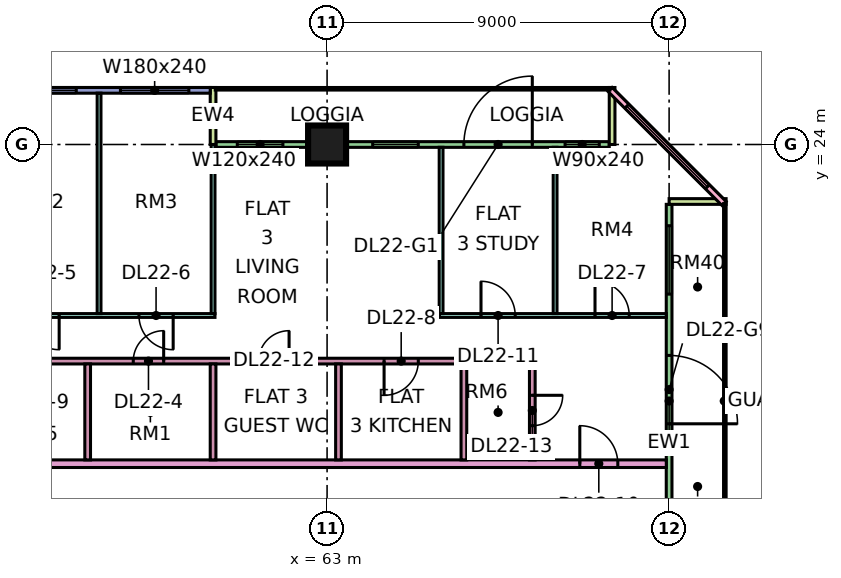
"""IFC4 building model, lengths in metres.
Left out: names, types, materials, properties, quantities, classifications, styles, units other than length and angle.
Written with IfcOpenShell. Run it as: python <this file> out.ifc"""

import sys

from ifc_helpers import new_model, si_unit, direction, frame, frame_2d, origin, origin_2d, place, context, subcontext, project, spatial, rectangle, extrude, element, fill, save


model = new_model("IFC4")
c1 = context("Model", 3, precision=1e-05, world=origin(), true_north=direction((0.0, 1.0)))
c2 = subcontext(c1, "Body", "Model", "MODEL_VIEW")
j1 = project(units=[si_unit("LENGTHUNIT", "METRE"), si_unit("PLANEANGLEUNIT", "RADIAN")], contexts=[c1])
p1 = place(None, origin())
s1 = spatial("IfcSite", under=j1, at=p1, CompositionType="ELEMENT")
p2 = place(p1, origin())
s2 = spatial("IfcBuilding", under=s1, at=p2, CompositionType="ELEMENT")
p3 = place(p2, frame((0.0, 0.0, 99.4)))
s3 = spatial("IfcBuildingStorey", under=s2, at=p3, CompositionType="ELEMENT", Elevation=99.4)
p4 = place(p3, frame((63.0, 24.0, 0.0), z_axis=(0.0, 0.0, 1.0), x_axis=(1.0, 0.0, 0.0)))
e1 = element("IfcColumn", 1, at=p4, inside=s3, PredefinedType="COLUMN", context=c2, shape_type="SweptSolid", body=[
    extrude(rectangle(XDim=1.0, YDim=1.0, at=origin_2d()), origin(), (0.0, 0.0, 1.0), 3.75),
])
p5 = place(p3, frame((70.425, 24.0, 0.0), z_axis=(0.0, 0.0, 1.0), x_axis=(-1.0, 0.0, 0.0)))
e2 = element("IfcWall", 2, at=p5, inside=s3, PredefinedType="SOLIDWALL", context=c2, shape_type="SweptSolid", body=[
    extrude(rectangle(XDim=10.35, YDim=0.15, at=frame_2d((5.175, 0.0))), origin(), (0.0, 0.0, 1.0), 3.35),
])
p6 = place(p5, frame((0.262, 0.0, 0.45)))
e3 = element("IfcOpeningElement", 3, at=p6, cuts=e2, PredefinedType="OPENING", context=c2, shape_type="SweptSolid", body=[
    extrude(rectangle(XDim=0.9, YDim=2.4, at=frame_2d((0.45, 1.2))), frame((0.0, 0.085, 0.0), z_axis=(0.0, -1.0, 0.0), x_axis=(1.0, 0.0, 0.0)), (0.0, 0.0, 1.0), 0.17),
])
p7 = place(p5, frame((2.025, 0.0, 0.0)))
e4 = element("IfcOpeningElement", 4, at=p7, cuts=e2, PredefinedType="OPENING", context=c2, shape_type="SweptSolid", body=[
    extrude(rectangle(XDim=1.8, YDim=2.4, at=frame_2d((0.9, 1.2))), frame((0.0, 0.085, 0.0), z_axis=(0.0, -1.0, 0.0), x_axis=(1.0, 0.0, 0.0)), (0.0, 0.0, 1.0), 0.17),
])
p8 = place(p5, frame((5.025, 0.0, 0.45)))
e5 = element("IfcOpeningElement", 5, at=p8, cuts=e2, PredefinedType="OPENING", context=c2, shape_type="SweptSolid", body=[
    extrude(rectangle(XDim=1.2, YDim=2.4, at=frame_2d((0.6, 1.2))), frame((0.0, 0.085, 0.0), z_axis=(0.0, -1.0, 0.0), x_axis=(1.0, 0.0, 0.0)), (0.0, 0.0, 1.0), 0.17),
])
p9 = place(p5, frame((8.587, 0.0, 0.45)))
e6 = element("IfcOpeningElement", 6, at=p9, cuts=e2, PredefinedType="OPENING", context=c2, shape_type="SweptSolid", body=[
    extrude(rectangle(XDim=1.2, YDim=2.4, at=frame_2d((0.6, 1.2))), frame((0.0, 0.085, 0.0), z_axis=(0.0, -1.0, 0.0), x_axis=(1.0, 0.0, 0.0)), (0.0, 0.0, 1.0), 0.17),
])
for number, where, z_axis, x_axis in (
    (7, (70.5, 25.5, 0.0), (0.0, 0.0, 1.0), (0.0, -1.0, 0.0)),
    (8, (60.0, 25.5, 0.0), (0.0, 0.0, 1.0), (0.0, -1.0, 0.0)),
):
    element("IfcWall", number, at=place(p3, frame(where, z_axis=z_axis, x_axis=x_axis)), inside=s3, PredefinedType="SOLIDWALL", context=c2, shape_type="SweptSolid", body=[
        extrude(rectangle(XDim=1.5, YDim=0.15, at=frame_2d((0.75, 0.0))), origin(), (0.0, 0.0, 1.0), 3.35),
    ])
p10 = place(p3, frame((59.925, 25.425, 0.0), z_axis=(0.0, 0.0, 1.0), x_axis=(-1.0, 0.0, 0.0)))
e9 = element("IfcWall", 9, at=p10, inside=s3, PredefinedType="SOLIDWALL", context=c2, shape_type="SweptSolid", body=[
    extrude(rectangle(XDim=11.85, YDim=0.15, at=frame_2d((5.925, 0.0))), origin(), (0.0, 0.0, 1.0), 3.35),
])
p11 = place(p10, frame((0.562, 0.0, 0.45)))
e10 = element("IfcOpeningElement", 10, at=p11, cuts=e9, PredefinedType="OPENING", context=c2, shape_type="SweptSolid", body=[
    extrude(rectangle(XDim=1.8, YDim=2.4, at=frame_2d((0.9, 1.2))), frame((0.0, 0.085, 0.0), z_axis=(0.0, -1.0, 0.0), x_axis=(1.0, 0.0, 0.0)), (0.0, 0.0, 1.0), 0.17),
])
p12 = place(p10, frame((3.525, 0.0, 0.45)))
e11 = element("IfcOpeningElement", 11, at=p12, cuts=e9, PredefinedType="OPENING", context=c2, shape_type="SweptSolid", body=[
    extrude(rectangle(XDim=1.8, YDim=2.4, at=frame_2d((0.9, 1.2))), frame((0.0, 0.085, 0.0), z_axis=(0.0, -1.0, 0.0), x_axis=(1.0, 0.0, 0.0)), (0.0, 0.0, 1.0), 0.17),
])
p13 = place(p10, frame((6.488, 0.0, 0.45)))
e12 = element("IfcOpeningElement", 12, at=p13, cuts=e9, PredefinedType="OPENING", context=c2, shape_type="SweptSolid", body=[
    extrude(rectangle(XDim=4.8, YDim=2.4, at=frame_2d((2.4, 1.2))), frame((0.0, 0.085, 0.0), z_axis=(0.0, -1.0, 0.0), x_axis=(1.0, 0.0, 0.0)), (0.0, 0.0, 1.0), 0.17),
])
p14 = place(p3, frame((72.0, 12.075, 0.0), z_axis=(0.0, 0.0, 1.0), x_axis=(0.0, 1.0, 0.0)))
e13 = element("IfcWall", 13, at=p14, inside=s3, PredefinedType="SOLIDWALL", context=c2, shape_type="SweptSolid", body=[
    extrude(rectangle(XDim=10.35, YDim=0.15, at=frame_2d((5.175, 0.0))), origin(), (0.0, 0.0, 1.0), 3.35),
])
p15 = place(p14, frame((4.575, 0.0, 0.0)))
e14 = element("IfcOpeningElement", 14, at=p15, cuts=e13, PredefinedType="OPENING", context=c2, shape_type="SweptSolid", body=[
    extrude(rectangle(XDim=1.8, YDim=2.4, at=frame_2d((0.9, 1.2))), frame((0.0, 0.085, 0.0), z_axis=(0.0, -1.0, 0.0), x_axis=(1.0, 0.0, 0.0)), (0.0, 0.0, 1.0), 0.17),
])
p16 = place(p14, frame((7.988, 0.0, 0.45)))
e15 = element("IfcOpeningElement", 15, at=p16, cuts=e13, PredefinedType="OPENING", context=c2, shape_type="SweptSolid", body=[
    extrude(rectangle(XDim=1.8, YDim=2.4, at=frame_2d((0.9, 1.2))), frame((0.0, 0.085, 0.0), z_axis=(0.0, -1.0, 0.0), x_axis=(1.0, 0.0, 0.0)), (0.0, 0.0, 1.0), 0.17),
])
p17 = place(p3, frame((73.5, 22.5, 0.0), z_axis=(0.0, 0.0, 1.0), x_axis=(-1.0, 0.0, 0.0)))
e16 = element("IfcWall", 16, at=p17, inside=s3, PredefinedType="SOLIDWALL", context=c2, shape_type="SweptSolid", body=[
    extrude(rectangle(XDim=1.5, YDim=0.15, at=frame_2d((0.75, 0.0))), origin(), (0.0, 0.0, 1.0), 3.35),
])
p18 = place(p3, frame((73.447, 22.447, 0.0), z_axis=(0.0, 0.0, 1.0), x_axis=(-0.707106781187, 0.707106781187, 0.0)))
e17 = element("IfcWall", 17, at=p18, inside=s3, PredefinedType="SOLIDWALL", context=c2, shape_type="SweptSolid", body=[
    extrude(rectangle(XDim=4.243, YDim=0.15, at=frame_2d((2.121, 0.0))), origin(), (0.0, 0.0, 1.0), 3.35),
])
p19 = place(p18, frame((0.621, 0.0, 0.45)))
e18 = element("IfcOpeningElement", 18, at=p19, cuts=e17, PredefinedType="OPENING", context=c2, shape_type="SweptSolid", body=[
    extrude(rectangle(XDim=3.0, YDim=2.4, at=frame_2d((1.5, 1.2))), frame((0.0, 0.085, 0.0), z_axis=(0.0, -1.0, 0.0), x_axis=(1.0, 0.0, 0.0)), (0.0, 0.0, 1.0), 0.17),
])
p20 = place(p3, frame((51.225, 15.6, 0.0), z_axis=(0.0, 0.0, 1.0), x_axis=(1.0, 0.0, 0.0)))
e19 = element("IfcWall", 19, at=p20, inside=s3, PredefinedType="PARTITIONING", context=c2, shape_type="SweptSolid", body=[
    extrude(rectangle(XDim=20.701, YDim=0.2, at=frame_2d((10.351, 0.0))), origin(), (0.0, 0.0, 1.0), 3.35),
])
p21 = place(p20, frame((18.425, 0.0, 0.0)))
e20 = element("IfcOpeningElement", 20, at=p21, cuts=e19, PredefinedType="OPENING", context=c2, shape_type="SweptSolid", body=[
    extrude(rectangle(XDim=1.0, YDim=2.1, at=frame_2d((0.5, 1.05))), frame((0.0, 0.11, 0.0), z_axis=(0.0, -1.0, 0.0), x_axis=(1.0, 0.0, 0.0)), (0.0, 0.0, 1.0), 0.22),
])
p22 = place(p20, frame((0.875, 0.0, 0.0)))
e21 = element("IfcOpeningElement", 21, at=p22, cuts=e19, PredefinedType="OPENING", context=c2, shape_type="SweptSolid", body=[
    extrude(rectangle(XDim=1.0, YDim=2.1, at=frame_2d((0.5, 1.05))), frame((0.0, 0.11, 0.0), z_axis=(0.0, -1.0, 0.0), x_axis=(1.0, 0.0, 0.0)), (0.0, 0.0, 1.0), 0.22),
])
p23 = place(p3, frame((54.1, 18.3, 0.0), z_axis=(0.0, 0.0, 1.0), x_axis=(1.0, 0.0, 0.0)))
e22 = element("IfcWall", 22, at=p23, inside=s3, PredefinedType="PARTITIONING", context=c2, shape_type="SweptSolid", body=[
    extrude(rectangle(XDim=14.375, YDim=0.15, at=frame_2d((7.188, 0.0))), origin(), (0.0, 0.0, 1.0), 3.35),
])
p24 = place(p23, frame((3.8, 0.0, 0.0)))
e23 = element("IfcOpeningElement", 23, at=p24, cuts=e22, PredefinedType="OPENING", context=c2, shape_type="SweptSolid", body=[
    extrude(rectangle(XDim=0.8, YDim=2.1, at=frame_2d((0.4, 1.05))), frame((0.0, 0.085, 0.0), z_axis=(0.0, -1.0, 0.0), x_axis=(1.0, 0.0, 0.0)), (0.0, 0.0, 1.0), 0.17),
])
p25 = place(p23, frame((10.4, 0.0, 0.0)))
e24 = element("IfcOpeningElement", 24, at=p25, cuts=e22, PredefinedType="OPENING", context=c2, shape_type="SweptSolid", body=[
    extrude(rectangle(XDim=0.9, YDim=2.1, at=frame_2d((0.45, 1.05))), frame((0.0, 0.085, 0.0), z_axis=(0.0, -1.0, 0.0), x_axis=(1.0, 0.0, 0.0)), (0.0, 0.0, 1.0), 0.17),
])
p26 = place(p23, frame((0.8, 0.0, 0.0)))
e25 = element("IfcOpeningElement", 25, at=p26, cuts=e22, PredefinedType="OPENING", context=c2, shape_type="SweptSolid", body=[
    extrude(rectangle(XDim=0.8, YDim=2.1, at=frame_2d((0.4, 1.05))), frame((0.0, 0.085, 0.0), z_axis=(0.0, -1.0, 0.0), x_axis=(1.0, 0.0, 0.0)), (0.0, 0.0, 1.0), 0.17),
])
p27 = place(p23, frame((7.1, 0.0, 0.0)))
e26 = element("IfcOpeningElement", 26, at=p27, cuts=e22, PredefinedType="OPENING", context=c2, shape_type="SweptSolid", body=[
    extrude(rectangle(XDim=0.8, YDim=2.1, at=frame_2d((0.4, 1.05))), frame((0.0, 0.085, 0.0), z_axis=(0.0, -1.0, 0.0), x_axis=(1.0, 0.0, 0.0)), (0.0, 0.0, 1.0), 0.17),
])
p28 = place(p3, frame((54.1, 19.5, 0.0), z_axis=(0.0, 0.0, 1.0), x_axis=(1.0, 0.0, 0.0)))
e27 = element("IfcWall", 27, at=p28, inside=s3, PredefinedType="PARTITIONING", context=c2, shape_type="SweptSolid", body=[
    extrude(rectangle(XDim=5.95, YDim=0.1, at=frame_2d((2.975, 0.0))), origin(), (0.0, 0.0, 1.0), 3.35),
])
p29 = place(p28, frame((0.95, 0.0, 0.0)))
e28 = element("IfcOpeningElement", 28, at=p29, cuts=e27, PredefinedType="OPENING", context=c2, shape_type="SweptSolid", body=[
    extrude(rectangle(XDim=0.9, YDim=2.1, at=frame_2d((0.45, 1.05))), frame((0.0, 0.06, 0.0), z_axis=(0.0, -1.0, 0.0), x_axis=(1.0, 0.0, 0.0)), (0.0, 0.0, 1.0), 0.12),
])
p30 = place(p28, frame((3.95, 0.0, 0.0)))
e29 = element("IfcOpeningElement", 29, at=p30, cuts=e27, PredefinedType="OPENING", context=c2, shape_type="SweptSolid", body=[
    extrude(rectangle(XDim=0.9, YDim=2.1, at=frame_2d((0.45, 1.05))), frame((0.0, 0.06, 0.0), z_axis=(0.0, -1.0, 0.0), x_axis=(1.0, 0.0, 0.0)), (0.0, 0.0, 1.0), 0.12),
])
p31 = place(p3, frame((56.7, 15.7, 0.0), z_axis=(0.0, 0.0, 1.0), x_axis=(0.0, 1.0, 0.0)))
e30 = element("IfcWall", 30, at=p31, inside=s3, PredefinedType="PARTITIONING", context=c2, shape_type="SweptSolid", body=[
    extrude(rectangle(XDim=2.525, YDim=0.15, at=frame_2d((1.263, 0.0))), origin(), (0.0, 0.0, 1.0), 3.35),
])
p32 = place(p3, frame((57.0, 19.55, 0.0), z_axis=(0.0, 0.0, 1.0), x_axis=(0.0, 1.0, 0.0)))
e31 = element("IfcWall", 31, at=p32, inside=s3, PredefinedType="PARTITIONING", context=c2, shape_type="SweptSolid", body=[
    extrude(rectangle(XDim=5.801, YDim=0.1, at=frame_2d((2.9, 0.0))), origin(), (0.0, 0.0, 1.0), 3.35),
])
p33 = place(p3, frame((60.0, 15.7, 0.0), z_axis=(0.0, 0.0, 1.0), x_axis=(0.0, 1.0, 0.0)))
e32 = element("IfcWall", 32, at=p33, inside=s3, PredefinedType="PARTITIONING", context=c2, shape_type="SweptSolid", body=[
    extrude(rectangle(XDim=2.525, YDim=0.15, at=frame_2d((1.263, 0.0))), origin(), (0.0, 0.0, 1.0), 3.35),
])
p34 = place(p3, frame((60.0, 19.55, 0.0), z_axis=(0.0, 0.0, 1.0), x_axis=(0.0, 1.0, 0.0)))
e33 = element("IfcWall", 33, at=p34, inside=s3, PredefinedType="PARTITIONING", context=c2, shape_type="SweptSolid", body=[
    extrude(rectangle(XDim=4.45, YDim=0.1, at=frame_2d((2.225, 0.0))), origin(), (0.0, 0.0, 1.0), 3.35),
])
p35 = place(p3, frame((63.3, 15.7, 0.0), z_axis=(0.0, 0.0, 1.0), x_axis=(0.0, 1.0, 0.0)))
e34 = element("IfcWall", 34, at=p35, inside=s3, PredefinedType="PARTITIONING", context=c2, shape_type="SweptSolid", body=[
    extrude(rectangle(XDim=2.525, YDim=0.15, at=frame_2d((1.263, 0.0))), origin(), (0.0, 0.0, 1.0), 3.35),
])
p36 = place(p3, frame((65.95, 19.5, 0.0), z_axis=(0.0, 0.0, 1.0), x_axis=(1.0, 0.0, 0.0)))
e35 = element("IfcWall", 35, at=p36, inside=s3, PredefinedType="PARTITIONING", context=c2, shape_type="SweptSolid", body=[
    extrude(rectangle(XDim=5.976, YDim=0.1, at=frame_2d((2.988, 0.0))), origin(), (0.0, 0.0, 1.0), 3.35),
])
p37 = place(p36, frame((4.1, 0.0, 0.0)))
e36 = element("IfcOpeningElement", 36, at=p37, cuts=e35, PredefinedType="OPENING", context=c2, shape_type="SweptSolid", body=[
    extrude(rectangle(XDim=0.9, YDim=2.1, at=frame_2d((0.45, 1.05))), frame((0.0, 0.06, 0.0), z_axis=(0.0, -1.0, 0.0), x_axis=(1.0, 0.0, 0.0)), (0.0, 0.0, 1.0), 0.12),
])
p38 = place(p36, frame((1.1, 0.0, 0.0)))
e37 = element("IfcOpeningElement", 37, at=p38, cuts=e35, PredefinedType="OPENING", context=c2, shape_type="SweptSolid", body=[
    extrude(rectangle(XDim=0.9, YDim=2.1, at=frame_2d((0.45, 1.05))), frame((0.0, 0.06, 0.0), z_axis=(0.0, -1.0, 0.0), x_axis=(1.0, 0.0, 0.0)), (0.0, 0.0, 1.0), 0.12),
])
p39 = place(p3, frame((66.0, 19.55, 0.0), z_axis=(0.0, 0.0, 1.0), x_axis=(0.0, 1.0, 0.0)))
e38 = element("IfcWall", 38, at=p39, inside=s3, PredefinedType="PARTITIONING", context=c2, shape_type="SweptSolid", body=[
    extrude(rectangle(XDim=4.376, YDim=0.1, at=frame_2d((2.188, 0.0))), origin(), (0.0, 0.0, 1.0), 3.35),
])
p40 = place(p3, frame((66.6, 15.7, 0.0), z_axis=(0.0, 0.0, 1.0), x_axis=(0.0, 1.0, 0.0)))
e39 = element("IfcWall", 39, at=p40, inside=s3, PredefinedType="PARTITIONING", context=c2, shape_type="SweptSolid", body=[
    extrude(rectangle(XDim=2.525, YDim=0.15, at=frame_2d((1.263, 0.0))), origin(), (0.0, 0.0, 1.0), 3.35),
])
p41 = place(p3, frame((68.4, 15.7, 0.0), z_axis=(0.0, 0.0, 1.0), x_axis=(0.0, 1.0, 0.0)))
e40 = element("IfcWall", 40, at=p41, inside=s3, PredefinedType="PARTITIONING", context=c2, shape_type="SweptSolid", body=[
    extrude(rectangle(XDim=2.525, YDim=0.15, at=frame_2d((1.263, 0.0))), origin(), (0.0, 0.0, 1.0), 3.35),
])
p42 = place(p41, frame((0.9, 0.0, 0.0)))
e41 = element("IfcOpeningElement", 41, at=p42, cuts=e40, PredefinedType="OPENING", context=c2, shape_type="SweptSolid", body=[
    extrude(rectangle(XDim=0.8, YDim=2.1, at=frame_2d((0.4, 1.05))), frame((0.0, 0.085, 0.0), z_axis=(0.0, -1.0, 0.0), x_axis=(1.0, 0.0, 0.0)), (0.0, 0.0, 1.0), 0.17),
])
p43 = place(p3, frame((69.0, 19.55, 0.0), z_axis=(0.0, 0.0, 1.0), x_axis=(0.0, 1.0, 0.0)))
e42 = element("IfcWall", 42, at=p43, inside=s3, PredefinedType="PARTITIONING", context=c2, shape_type="SweptSolid", body=[
    extrude(rectangle(XDim=4.376, YDim=0.1, at=frame_2d((2.188, 0.0))), origin(), (0.0, 0.0, 1.0), 3.35),
])
p44 = place(p6, origin())
e43 = element("IfcWindow", 43, at=p44, inside=s3, PartitioningType="SINGLE_PANEL", PredefinedType="WINDOW", context=c2, shape_type="SweptSolid", body=[
    extrude(rectangle(XDim=0.9, YDim=2.4, at=frame_2d((0.45, 1.2))), frame((0.0, 0.03, 0.0), z_axis=(0.0, -1.0, 0.0), x_axis=(1.0, 0.0, 0.0)), (0.0, 0.0, 1.0), 0.06),
])
fill(e3, e43)
p45 = place(p7, frame((1.8, 0.0, 0.0), z_axis=(0.0, 0.0, 1.0), x_axis=(-1.0, 0.0, 0.0)))
e44 = element("IfcDoor", 44, at=p45, inside=s3, OperationType="DOUBLE_DOOR_SINGLE_SWING", PredefinedType="DOOR", context=c2, shape_type="SweptSolid", body=[
    extrude(rectangle(XDim=1.8, YDim=2.4, at=frame_2d((0.9, 1.2))), frame((0.0, 0.025, 0.0), z_axis=(0.0, -1.0, 0.0), x_axis=(1.0, 0.0, 0.0)), (0.0, 0.0, 1.0), 0.05),
])
fill(e4, e44)
p46 = place(p8, origin())
e45 = element("IfcWindow", 45, at=p46, inside=s3, PartitioningType="SINGLE_PANEL", PredefinedType="WINDOW", context=c2, shape_type="SweptSolid", body=[
    extrude(rectangle(XDim=1.2, YDim=2.4, at=frame_2d((0.6, 1.2))), frame((0.0, 0.03, 0.0), z_axis=(0.0, -1.0, 0.0), x_axis=(1.0, 0.0, 0.0)), (0.0, 0.0, 1.0), 0.06),
])
fill(e5, e45)
p47 = place(p9, origin())
e46 = element("IfcWindow", 46, at=p47, inside=s3, PartitioningType="SINGLE_PANEL", PredefinedType="WINDOW", context=c2, shape_type="SweptSolid", body=[
    extrude(rectangle(XDim=1.2, YDim=2.4, at=frame_2d((0.6, 1.2))), frame((0.0, 0.03, 0.0), z_axis=(0.0, -1.0, 0.0), x_axis=(1.0, 0.0, 0.0)), (0.0, 0.0, 1.0), 0.06),
])
fill(e6, e46)
p48 = place(p11, origin())
e47 = element("IfcWindow", 47, at=p48, inside=s3, PartitioningType="SINGLE_PANEL", PredefinedType="WINDOW", context=c2, shape_type="SweptSolid", body=[
    extrude(rectangle(XDim=1.8, YDim=2.4, at=frame_2d((0.9, 1.2))), frame((0.0, 0.03, 0.0), z_axis=(0.0, -1.0, 0.0), x_axis=(1.0, 0.0, 0.0)), (0.0, 0.0, 1.0), 0.06),
])
fill(e10, e47)
p49 = place(p12, origin())
e48 = element("IfcWindow", 48, at=p49, inside=s3, PartitioningType="SINGLE_PANEL", PredefinedType="WINDOW", context=c2, shape_type="SweptSolid", body=[
    extrude(rectangle(XDim=1.8, YDim=2.4, at=frame_2d((0.9, 1.2))), frame((0.0, 0.03, 0.0), z_axis=(0.0, -1.0, 0.0), x_axis=(1.0, 0.0, 0.0)), (0.0, 0.0, 1.0), 0.06),
])
fill(e11, e48)
p50 = place(p15, frame((1.8, 0.0, 0.0), z_axis=(0.0, 0.0, 1.0), x_axis=(-1.0, 0.0, 0.0)))
e49 = element("IfcDoor", 49, at=p50, inside=s3, OperationType="DOUBLE_DOOR_SINGLE_SWING", PredefinedType="DOOR", context=c2, shape_type="SweptSolid", body=[
    extrude(rectangle(XDim=1.8, YDim=2.4, at=frame_2d((0.9, 1.2))), frame((0.0, 0.025, 0.0), z_axis=(0.0, -1.0, 0.0), x_axis=(1.0, 0.0, 0.0)), (0.0, 0.0, 1.0), 0.05),
])
fill(e14, e49)
p51 = place(p16, origin())
e50 = element("IfcWindow", 50, at=p51, inside=s3, PartitioningType="SINGLE_PANEL", PredefinedType="WINDOW", context=c2, shape_type="SweptSolid", body=[
    extrude(rectangle(XDim=1.8, YDim=2.4, at=frame_2d((0.9, 1.2))), frame((0.0, 0.03, 0.0), z_axis=(0.0, -1.0, 0.0), x_axis=(1.0, 0.0, 0.0)), (0.0, 0.0, 1.0), 0.06),
])
fill(e15, e50)
p52 = place(p19, origin())
e51 = element("IfcWindow", 51, at=p52, inside=s3, PartitioningType="SINGLE_PANEL", PredefinedType="WINDOW", context=c2, shape_type="SweptSolid", body=[
    extrude(rectangle(XDim=3.0, YDim=2.4, at=frame_2d((1.5, 1.2))), frame((0.0, 0.03, 0.0), z_axis=(0.0, -1.0, 0.0), x_axis=(1.0, 0.0, 0.0)), (0.0, 0.0, 1.0), 0.06),
])
fill(e18, e51)
p53 = place(p24, frame((0.8, 0.0, 0.0), z_axis=(0.0, 0.0, 1.0), x_axis=(-1.0, 0.0, 0.0)))
e52 = element("IfcDoor", 52, at=p53, inside=s3, OperationType="SINGLE_SWING_RIGHT", PredefinedType="DOOR", context=c2, shape_type="SweptSolid", body=[
    extrude(rectangle(XDim=0.8, YDim=2.1, at=frame_2d((0.4, 1.05))), frame((0.0, 0.025, 0.0), z_axis=(0.0, -1.0, 0.0), x_axis=(1.0, 0.0, 0.0)), (0.0, 0.0, 1.0), 0.05),
])
fill(e23, e52)
p54 = place(p29, origin())
e53 = element("IfcDoor", 53, at=p54, inside=s3, OperationType="SINGLE_SWING_RIGHT", PredefinedType="DOOR", context=c2, shape_type="SweptSolid", body=[
    extrude(rectangle(XDim=0.9, YDim=2.1, at=frame_2d((0.45, 1.05))), frame((0.0, 0.025, 0.0), z_axis=(0.0, -1.0, 0.0), x_axis=(1.0, 0.0, 0.0)), (0.0, 0.0, 1.0), 0.05),
])
fill(e28, e53)
p55 = place(p30, origin())
e54 = element("IfcDoor", 54, at=p55, inside=s3, OperationType="SINGLE_SWING_RIGHT", PredefinedType="DOOR", context=c2, shape_type="SweptSolid", body=[
    extrude(rectangle(XDim=0.9, YDim=2.1, at=frame_2d((0.45, 1.05))), frame((0.0, 0.025, 0.0), z_axis=(0.0, -1.0, 0.0), x_axis=(1.0, 0.0, 0.0)), (0.0, 0.0, 1.0), 0.05),
])
fill(e29, e54)
p56 = place(p37, origin())
e55 = element("IfcDoor", 55, at=p56, inside=s3, OperationType="SINGLE_SWING_LEFT", PredefinedType="DOOR", context=c2, shape_type="SweptSolid", body=[
    extrude(rectangle(XDim=0.9, YDim=2.1, at=frame_2d((0.45, 1.05))), frame((0.0, 0.025, 0.0), z_axis=(0.0, -1.0, 0.0), x_axis=(1.0, 0.0, 0.0)), (0.0, 0.0, 1.0), 0.05),
])
fill(e36, e55)
p57 = place(p25, frame((0.9, 0.0, 0.0), z_axis=(0.0, 0.0, 1.0), x_axis=(-1.0, 0.0, 0.0)))
e56 = element("IfcDoor", 56, at=p57, inside=s3, OperationType="SINGLE_SWING_LEFT", PredefinedType="DOOR", context=c2, shape_type="SweptSolid", body=[
    extrude(rectangle(XDim=0.9, YDim=2.1, at=frame_2d((0.45, 1.05))), frame((0.0, 0.025, 0.0), z_axis=(0.0, -1.0, 0.0), x_axis=(1.0, 0.0, 0.0)), (0.0, 0.0, 1.0), 0.05),
])
fill(e24, e56)
p58 = place(p21, origin())
e57 = element("IfcDoor", 57, at=p58, inside=s3, OperationType="SINGLE_SWING_LEFT", PredefinedType="DOOR", context=c2, shape_type="SweptSolid", body=[
    extrude(rectangle(XDim=1.0, YDim=2.1, at=frame_2d((0.5, 1.05))), frame((0.0, 0.025, 0.0), z_axis=(0.0, -1.0, 0.0), x_axis=(1.0, 0.0, 0.0)), (0.0, 0.0, 1.0), 0.05),
])
fill(e20, e57)
p59 = place(p38, origin())
e58 = element("IfcDoor", 58, at=p59, inside=s3, OperationType="SINGLE_SWING_LEFT", PredefinedType="DOOR", context=c2, shape_type="SweptSolid", body=[
    extrude(rectangle(XDim=0.9, YDim=2.1, at=frame_2d((0.45, 1.05))), frame((0.0, 0.025, 0.0), z_axis=(0.0, -1.0, 0.0), x_axis=(1.0, 0.0, 0.0)), (0.0, 0.0, 1.0), 0.05),
])
fill(e37, e58)
p60 = place(p27, frame((0.8, 0.0, 0.0), z_axis=(0.0, 0.0, 1.0), x_axis=(-1.0, 0.0, 0.0)))
e59 = element("IfcDoor", 59, at=p60, inside=s3, OperationType="SINGLE_SWING_RIGHT", PredefinedType="DOOR", context=c2, shape_type="SweptSolid", body=[
    extrude(rectangle(XDim=0.8, YDim=2.1, at=frame_2d((0.4, 1.05))), frame((0.0, 0.025, 0.0), z_axis=(0.0, -1.0, 0.0), x_axis=(1.0, 0.0, 0.0)), (0.0, 0.0, 1.0), 0.05),
])
fill(e26, e59)
p61 = place(p42, origin())
e60 = element("IfcDoor", 60, at=p61, inside=s3, OperationType="SINGLE_SWING_RIGHT", PredefinedType="DOOR", context=c2, shape_type="SweptSolid", body=[
    extrude(rectangle(XDim=0.8, YDim=2.1, at=frame_2d((0.4, 1.05))), frame((0.0, 0.025, 0.0), z_axis=(0.0, -1.0, 0.0), x_axis=(1.0, 0.0, 0.0)), (0.0, 0.0, 1.0), 0.05),
])
fill(e41, e60)
save(model, sys.argv[1])
